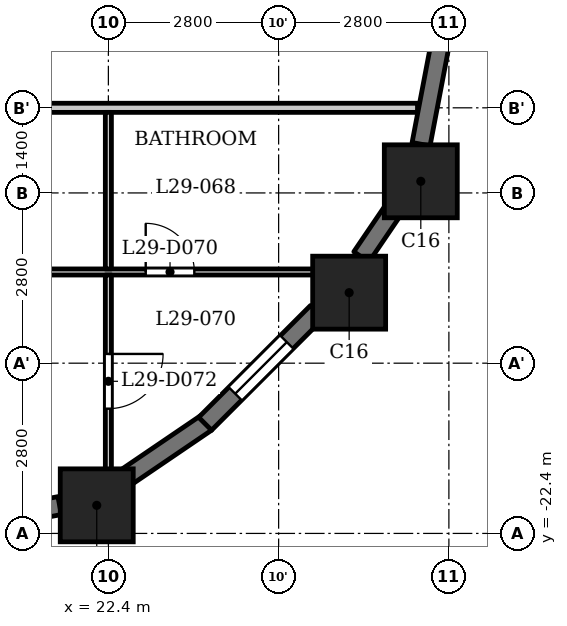
"""IFC4 building model, lengths in metres.
Left out: names, types, materials, properties, quantities, classifications, styles, units other than length and angle.
Written with IfcOpenShell. Run it as: python <this file> out.ifc"""

import sys

from ifc_helpers import new_model, si_unit, direction, frame, frame_2d, origin, origin_2d, place, context, subcontext, project, spatial, rectangle, extrude, element, fill, save


model = new_model("IFC4")
c1 = context("Model", 3, precision=1e-05, world=origin(), true_north=direction((0.0, 1.0)))
c2 = subcontext(c1, "Body", "Model", "MODEL_VIEW")
j1 = project(units=[si_unit("LENGTHUNIT", "METRE"), si_unit("PLANEANGLEUNIT", "RADIAN")], contexts=[c1])
p1 = place(None, origin())
s1 = spatial("IfcSite", under=j1, at=p1, CompositionType="ELEMENT")
p2 = place(p1, origin())
s2 = spatial("IfcBuilding", under=s1, at=p2, CompositionType="ELEMENT")
p3 = place(p2, frame((0.0, 0.0, 114.8)))
s3 = spatial("IfcBuildingStorey", under=s2, at=p3, CompositionType="ELEMENT", Elevation=114.8)
for number, where, z_axis, x_axis in (
    (1, (22.209, -21.938, 0.0), (0.0, 0.0, 1.0), (1.0, 0.0, 0.0)),
    (2, (26.36, -18.44, 0.0), (0.0, 0.0, 1.0), (1.0, 0.0, 0.0)),
    (3, (27.538, -16.609, 0.0), (0.0, 0.0, 1.0), (1.0, 0.0, 0.0)),
):
    element("IfcColumn", number, at=place(p3, frame(where, z_axis=z_axis, x_axis=x_axis)), inside=s3, PredefinedType="COLUMN", context=c2, shape_type="SweptSolid", body=[
        extrude(rectangle(XDim=1.2, YDim=1.2, at=origin_2d()), origin(), (0.0, 0.0, 1.0), 3.5),
    ])
for number, where, z_axis, x_axis in (
    (4, (19.972, -22.253, 0.0), (0.0, 0.0, 1.0), (0.982, 0.187, 0.0)),
    (5, (22.643, -21.51, 0.0), (0.0, 0.0, 1.0), (0.827, 0.562, 0.0)),
):
    element("IfcWall", number, at=place(p3, frame(where, z_axis=z_axis, x_axis=x_axis)), inside=s3, PredefinedType="SOLIDWALL", context=c2, shape_type="SweptSolid", body=[
        extrude(rectangle(XDim=1.656, YDim=0.3, at=frame_2d((0.828, 0.0))), origin(), (0.0, 0.0, 1.0), 2.4),
    ])
p4 = place(p3, frame((23.991, -20.597, 0.0), z_axis=(0.0, 0.0, 1.0), x_axis=(0.707106781187, 0.707106781187, 0.0)))
e6 = element("IfcWall", 6, at=p4, inside=s3, PredefinedType="SOLIDWALL", context=c2, shape_type="SweptSolid", body=[
    extrude(rectangle(XDim=2.6, YDim=0.3, at=frame_2d((1.3, 0.0))), origin(), (0.0, 0.0, 1.0), 2.4),
])
p5 = place(p4, frame((0.7, 0.0, 0.6)))
e7 = element("IfcOpeningElement", 7, at=p5, cuts=e6, PredefinedType="OPENING", context=c2, shape_type="SweptSolid", body=[
    extrude(rectangle(XDim=1.2, YDim=1.55, at=frame_2d((0.6, 0.775))), frame((0.0, 0.16, 0.0), z_axis=(0.0, -1.0, 0.0), x_axis=(1.0, 0.0, 0.0)), (0.0, 0.0, 1.0), 0.32),
])
p6 = place(p3, frame((26.561, -17.851, 0.0), z_axis=(0.0, 0.0, 1.0), x_axis=(0.562173331661, 0.827019434577, 0.0)))
e8 = element("IfcWall", 8, at=p6, inside=s3, PredefinedType="SOLIDWALL", context=c2, shape_type="SweptSolid", body=[
    extrude(rectangle(XDim=0.977, YDim=0.3, at=frame_2d((0.489, 0.0))), origin(), (0.0, 0.0, 1.0), 3.2),
])
p7 = place(p3, frame((27.542, -15.999, 0.0), z_axis=(0.0, 0.0, 1.0), x_axis=(0.187349172861, 0.982293381546, 0.0)))
e9 = element("IfcWall", 9, at=p7, inside=s3, PredefinedType="SOLIDWALL", context=c2, shape_type="SweptSolid", body=[
    extrude(rectangle(XDim=1.656, YDim=0.3, at=frame_2d((0.828, 0.0))), origin(), (0.0, 0.0, 1.0), 2.4),
])
p8 = place(p3, frame((-26.19, -18.1, 0.0), z_axis=(0.0, 0.0, 1.0), x_axis=(1.0, 0.0, 0.0)))
e10 = element("IfcWall", 10, at=p8, inside=s3, PredefinedType="PARTITIONING", context=c2, shape_type="SweptSolid", body=[
    extrude(rectangle(XDim=52.63, YDim=0.1, at=frame_2d((26.315, 0.0))), origin(), (0.0, 0.0, 1.0), 3.2),
])
p9 = place(p8, frame((1.09, 0.0, 0.0)))
e11 = element("IfcOpeningElement", 11, at=p9, cuts=e10, PredefinedType="OPENING", context=c2, shape_type="SweptSolid", body=[
    extrude(rectangle(XDim=0.8, YDim=2.1, at=frame_2d((0.4, 1.05))), frame((0.0, 0.06, 0.0), z_axis=(0.0, -1.0, 0.0), x_axis=(1.0, 0.0, 0.0)), (0.0, 0.0, 1.0), 0.12),
])
p10 = place(p8, frame((4.44, 0.0, 0.0)))
e12 = element("IfcOpeningElement", 12, at=p10, cuts=e10, PredefinedType="OPENING", context=c2, shape_type="SweptSolid", body=[
    extrude(rectangle(XDim=0.9, YDim=2.1, at=frame_2d((0.45, 1.05))), frame((0.0, 0.06, 0.0), z_axis=(0.0, -1.0, 0.0), x_axis=(1.0, 0.0, 0.0)), (0.0, 0.0, 1.0), 0.12),
])
p11 = place(p8, frame((10.14, 0.0, 0.0)))
e13 = element("IfcOpeningElement", 13, at=p11, cuts=e10, PredefinedType="OPENING", context=c2, shape_type="SweptSolid", body=[
    extrude(rectangle(XDim=0.8, YDim=2.1, at=frame_2d((0.4, 1.05))), frame((0.0, 0.06, 0.0), z_axis=(0.0, -1.0, 0.0), x_axis=(1.0, 0.0, 0.0)), (0.0, 0.0, 1.0), 0.12),
])
p12 = place(p8, frame((12.74, 0.0, 0.0)))
e14 = element("IfcOpeningElement", 14, at=p12, cuts=e10, PredefinedType="OPENING", context=c2, shape_type="SweptSolid", body=[
    extrude(rectangle(XDim=0.9, YDim=2.1, at=frame_2d((0.45, 1.05))), frame((0.0, 0.06, 0.0), z_axis=(0.0, -1.0, 0.0), x_axis=(1.0, 0.0, 0.0)), (0.0, 0.0, 1.0), 0.12),
])
p13 = place(p8, frame((16.14, 0.0, 0.0)))
e15 = element("IfcOpeningElement", 15, at=p13, cuts=e10, PredefinedType="OPENING", context=c2, shape_type="SweptSolid", body=[
    extrude(rectangle(XDim=0.9, YDim=2.1, at=frame_2d((0.45, 1.05))), frame((0.0, 0.06, 0.0), z_axis=(0.0, -1.0, 0.0), x_axis=(1.0, 0.0, 0.0)), (0.0, 0.0, 1.0), 0.12),
])
p14 = place(p8, frame((18.99, 0.0, 0.0)))
e16 = element("IfcOpeningElement", 16, at=p14, cuts=e10, PredefinedType="OPENING", context=c2, shape_type="SweptSolid", body=[
    extrude(rectangle(XDim=0.9, YDim=2.1, at=frame_2d((0.45, 1.05))), frame((0.0, 0.06, 0.0), z_axis=(0.0, -1.0, 0.0), x_axis=(1.0, 0.0, 0.0)), (0.0, 0.0, 1.0), 0.12),
])
p15 = place(p8, frame((26.84, 0.0, 0.0)))
e17 = element("IfcOpeningElement", 17, at=p15, cuts=e10, PredefinedType="OPENING", context=c2, shape_type="SweptSolid", body=[
    extrude(rectangle(XDim=0.8, YDim=2.1, at=frame_2d((0.4, 1.05))), frame((0.0, 0.06, 0.0), z_axis=(0.0, -1.0, 0.0), x_axis=(1.0, 0.0, 0.0)), (0.0, 0.0, 1.0), 0.12),
])
p16 = place(p8, frame((21.24, 0.0, 0.0)))
e18 = element("IfcOpeningElement", 18, at=p16, cuts=e10, PredefinedType="OPENING", context=c2, shape_type="SweptSolid", body=[
    extrude(rectangle(XDim=0.9, YDim=2.1, at=frame_2d((0.45, 1.05))), frame((0.0, 0.06, 0.0), z_axis=(0.0, -1.0, 0.0), x_axis=(1.0, 0.0, 0.0)), (0.0, 0.0, 1.0), 0.12),
])
p17 = place(p8, frame((32.54, 0.0, 0.0)))
e19 = element("IfcOpeningElement", 19, at=p17, cuts=e10, PredefinedType="OPENING", context=c2, shape_type="SweptSolid", body=[
    extrude(rectangle(XDim=0.8, YDim=2.1, at=frame_2d((0.4, 1.05))), frame((0.0, 0.06, 0.0), z_axis=(0.0, -1.0, 0.0), x_axis=(1.0, 0.0, 0.0)), (0.0, 0.0, 1.0), 0.12),
])
p18 = place(p8, frame((35.14, 0.0, 0.0)))
e20 = element("IfcOpeningElement", 20, at=p18, cuts=e10, PredefinedType="OPENING", context=c2, shape_type="SweptSolid", body=[
    extrude(rectangle(XDim=0.9, YDim=2.1, at=frame_2d((0.45, 1.05))), frame((0.0, 0.06, 0.0), z_axis=(0.0, -1.0, 0.0), x_axis=(1.0, 0.0, 0.0)), (0.0, 0.0, 1.0), 0.12),
])
p19 = place(p8, frame((38.54, 0.0, 0.0)))
e21 = element("IfcOpeningElement", 21, at=p19, cuts=e10, PredefinedType="OPENING", context=c2, shape_type="SweptSolid", body=[
    extrude(rectangle(XDim=0.9, YDim=2.1, at=frame_2d((0.45, 1.05))), frame((0.0, 0.06, 0.0), z_axis=(0.0, -1.0, 0.0), x_axis=(1.0, 0.0, 0.0)), (0.0, 0.0, 1.0), 0.12),
])
p20 = place(p8, frame((41.39, 0.0, 0.0)))
e22 = element("IfcOpeningElement", 22, at=p20, cuts=e10, PredefinedType="OPENING", context=c2, shape_type="SweptSolid", body=[
    extrude(rectangle(XDim=0.9, YDim=2.1, at=frame_2d((0.45, 1.05))), frame((0.0, 0.06, 0.0), z_axis=(0.0, -1.0, 0.0), x_axis=(1.0, 0.0, 0.0)), (0.0, 0.0, 1.0), 0.12),
])
p21 = place(p8, frame((49.204, 0.0, 0.0)))
e23 = element("IfcOpeningElement", 23, at=p21, cuts=e10, PredefinedType="OPENING", context=c2, shape_type="SweptSolid", body=[
    extrude(rectangle(XDim=0.8, YDim=2.1, at=frame_2d((0.4, 1.05))), frame((0.0, 0.06, 0.0), z_axis=(0.0, -1.0, 0.0), x_axis=(1.0, 0.0, 0.0)), (0.0, 0.0, 1.0), 0.12),
])
p22 = place(p8, frame((43.64, 0.0, 0.0)))
e24 = element("IfcOpeningElement", 24, at=p22, cuts=e10, PredefinedType="OPENING", context=c2, shape_type="SweptSolid", body=[
    extrude(rectangle(XDim=0.9, YDim=2.1, at=frame_2d((0.45, 1.05))), frame((0.0, 0.06, 0.0), z_axis=(0.0, -1.0, 0.0), x_axis=(1.0, 0.0, 0.0)), (0.0, 0.0, 1.0), 0.12),
])
p23 = place(p3, frame((-27.484, -15.4, 0.0), z_axis=(0.0, 0.0, 1.0), x_axis=(1.0, 0.0, 0.0)))
e25 = element("IfcWall", 25, at=p23, inside=s3, PredefinedType="PARTITIONING", context=c2, shape_type="SweptSolid", body=[
    extrude(rectangle(XDim=54.968, YDim=0.15, at=frame_2d((27.484, 0.0))), origin(), (0.0, 0.0, 1.0), 3.2),
])
p24 = place(p23, frame((5.734, 0.0, 0.0)))
e26 = element("IfcOpeningElement", 26, at=p24, cuts=e25, PredefinedType="OPENING", context=c2, shape_type="SweptSolid", body=[
    extrude(rectangle(XDim=1.0, YDim=2.1, at=frame_2d((0.5, 1.05))), frame((0.0, 0.085, 0.0), z_axis=(0.0, -1.0, 0.0), x_axis=(1.0, 0.0, 0.0)), (0.0, 0.0, 1.0), 0.17),
])
p25 = place(p23, frame((16.934, 0.0, 0.0)))
e27 = element("IfcOpeningElement", 27, at=p25, cuts=e25, PredefinedType="OPENING", context=c2, shape_type="SweptSolid", body=[
    extrude(rectangle(XDim=1.0, YDim=2.1, at=frame_2d((0.5, 1.05))), frame((0.0, 0.085, 0.0), z_axis=(0.0, -1.0, 0.0), x_axis=(1.0, 0.0, 0.0)), (0.0, 0.0, 1.0), 0.17),
])
p26 = place(p23, frame((22.534, 0.0, 0.0)))
e28 = element("IfcOpeningElement", 28, at=p26, cuts=e25, PredefinedType="OPENING", context=c2, shape_type="SweptSolid", body=[
    extrude(rectangle(XDim=1.0, YDim=2.1, at=frame_2d((0.5, 1.05))), frame((0.0, 0.085, 0.0), z_axis=(0.0, -1.0, 0.0), x_axis=(1.0, 0.0, 0.0)), (0.0, 0.0, 1.0), 0.17),
])
p27 = place(p23, frame((39.334, 0.0, 0.0)))
e29 = element("IfcOpeningElement", 29, at=p27, cuts=e25, PredefinedType="OPENING", context=c2, shape_type="SweptSolid", body=[
    extrude(rectangle(XDim=1.0, YDim=2.1, at=frame_2d((0.5, 1.05))), frame((0.0, 0.085, 0.0), z_axis=(0.0, -1.0, 0.0), x_axis=(1.0, 0.0, 0.0)), (0.0, 0.0, 1.0), 0.17),
])
p28 = place(p23, frame((44.934, 0.0, 0.0)))
e30 = element("IfcOpeningElement", 30, at=p28, cuts=e25, PredefinedType="OPENING", context=c2, shape_type="SweptSolid", body=[
    extrude(rectangle(XDim=1.0, YDim=2.1, at=frame_2d((0.5, 1.05))), frame((0.0, 0.085, 0.0), z_axis=(0.0, -1.0, 0.0), x_axis=(1.0, 0.0, 0.0)), (0.0, 0.0, 1.0), 0.17),
])
p29 = place(p3, frame((22.4, -21.72, 0.0), z_axis=(0.0, 0.0, 1.0), x_axis=(0.0, 1.0, 0.0)))
e31 = element("IfcWall", 31, at=p29, inside=s3, PredefinedType="PARTITIONING", context=c2, shape_type="SweptSolid", body=[
    extrude(rectangle(XDim=3.57, YDim=0.1, at=frame_2d((1.785, 0.0))), origin(), (0.0, 0.0, 1.0), 3.2),
])
p30 = place(p29, frame((1.372, 0.0, 0.0)))
e32 = element("IfcOpeningElement", 32, at=p30, cuts=e31, PredefinedType="OPENING", context=c2, shape_type="SweptSolid", body=[
    extrude(rectangle(XDim=0.9, YDim=2.1, at=frame_2d((0.45, 1.05))), frame((0.0, 0.06, 0.0), z_axis=(0.0, -1.0, 0.0), x_axis=(1.0, 0.0, 0.0)), (0.0, 0.0, 1.0), 0.12),
])
p31 = place(p3, frame((22.4, -18.05, 0.0), z_axis=(0.0, 0.0, 1.0), x_axis=(0.0, 1.0, 0.0)))
e33 = element("IfcWall", 33, at=p31, inside=s3, PredefinedType="PARTITIONING", context=c2, shape_type="SweptSolid", body=[
    extrude(rectangle(XDim=2.575, YDim=0.1, at=frame_2d((1.288, 0.0))), origin(), (0.0, 0.0, 1.0), 3.2),
])
p32 = place(p21, origin())
e34 = element("IfcDoor", 34, at=p32, inside=s3, OperationType="SINGLE_SWING_RIGHT", PredefinedType="DOOR", context=c2, shape_type="SweptSolid", body=[
    extrude(rectangle(XDim=0.8, YDim=2.1, at=frame_2d((0.4, 1.05))), frame((0.0, 0.025, 0.0), z_axis=(0.0, -1.0, 0.0), x_axis=(1.0, 0.0, 0.0)), (0.0, 0.0, 1.0), 0.05),
])
fill(e23, e34)
p33 = place(p30, origin())
e35 = element("IfcDoor", 35, at=p33, inside=s3, OperationType="SINGLE_SWING_RIGHT", PredefinedType="DOOR", context=c2, shape_type="SweptSolid", body=[
    extrude(rectangle(XDim=0.9, YDim=2.1, at=frame_2d((0.45, 1.05))), frame((0.0, 0.025, 0.0), z_axis=(0.0, -1.0, 0.0), x_axis=(1.0, 0.0, 0.0)), (0.0, 0.0, 1.0), 0.05),
])
fill(e32, e35)
p34 = place(p5, origin())
e36 = element("IfcWindow", 36, at=p34, inside=s3, PartitioningType="SINGLE_PANEL", PredefinedType="WINDOW", context=c2, shape_type="SweptSolid", body=[
    extrude(rectangle(XDim=1.2, YDim=1.55, at=frame_2d((0.6, 0.775))), frame((0.0, 0.03, 0.0), z_axis=(0.0, -1.0, 0.0), x_axis=(1.0, 0.0, 0.0)), (0.0, 0.0, 1.0), 0.06),
])
fill(e7, e36)
save(model, sys.argv[1])
